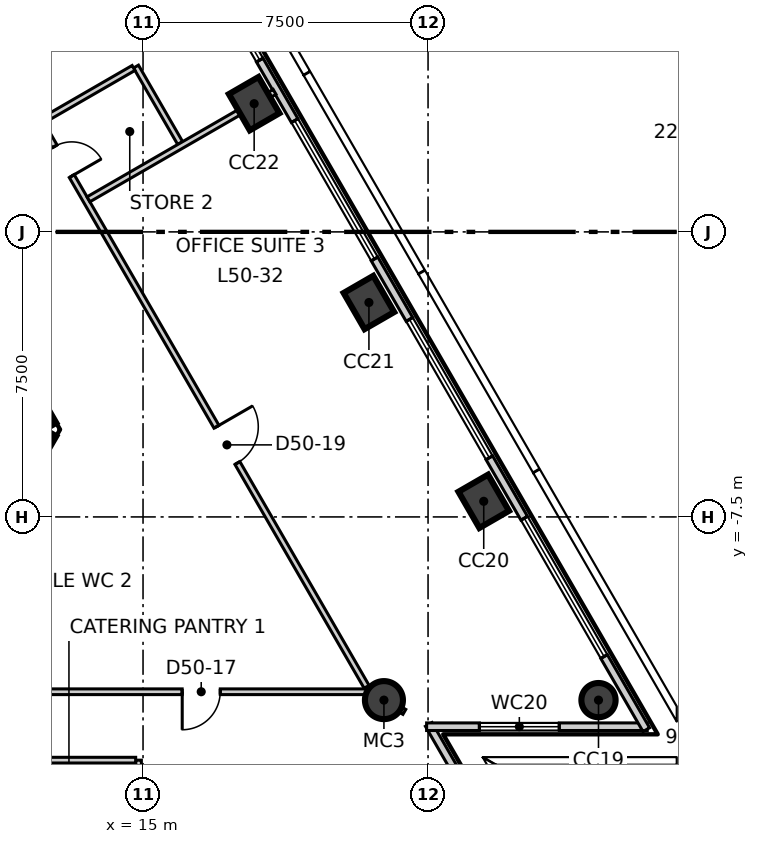
"""IFC4 building model, lengths in metres.
Left out: names, types, materials, properties, quantities, classifications, styles, units other than length and angle.
Written with IfcOpenShell. Run it as: python <this file> out.ifc"""

import sys

from ifc_helpers import new_model, si_unit, direction, frame, frame_2d, origin, origin_2d, place, context, subcontext, project, spatial, polyline, rectangle, circle, outline, extrude, element, fill, save


model = new_model("IFC4")
c1 = context("Model", 3, precision=1e-05, world=origin(), true_north=direction((0.0, 1.0)))
c2 = subcontext(c1, "Body", "Model", "MODEL_VIEW")
j1 = project(units=[si_unit("LENGTHUNIT", "METRE"), si_unit("PLANEANGLEUNIT", "RADIAN")], contexts=[c1])
p1 = place(None, origin())
s1 = spatial("IfcSite", under=j1, at=p1, CompositionType="ELEMENT")
p2 = place(p1, origin())
s2 = spatial("IfcBuilding", under=s1, at=p2, CompositionType="ELEMENT")
p3 = place(p2, frame((0.0, 0.0, 215.3)))
s3 = spatial("IfcBuildingStorey", under=s2, at=p3, CompositionType="ELEMENT", Elevation=215.3)
p4 = place(p3, frame((10.71, -8.15, -0.3), z_axis=(0.0, 0.0, 1.0), x_axis=(0.49999337185, 0.866029230515, 0.0)))
e1 = element("IfcWall", 1, at=p4, inside=s3, PredefinedType="SHEAR", context=c2, shape_type="SweptSolid", body=[
    extrude(outline(polyline([(-0.202, -0.35), (1.703, -0.35), (3.608, -0.35), (3.204, 0.35), (1.703, 0.35), (0.202, 0.35), (-0.202, -0.35)])), origin(), (0.0, 0.0, 1.0), 4.0),
])
p5 = place(p4, frame((1.003, 0.0, 0.3)))
e2 = element("IfcOpeningElement", 2, at=p5, cuts=e1, PredefinedType="OPENING", context=c2, shape_type="SweptSolid", body=[
    extrude(rectangle(XDim=1.4, YDim=2.1, at=frame_2d((0.7, 1.05))), frame((0.0, 0.36, 0.0), z_axis=(0.0, -1.0, 0.0), x_axis=(1.0, 0.0, 0.0)), (0.0, 0.0, 1.0), 0.72),
])
p6 = place(p3, frame((12.413, -5.2, -0.3), z_axis=(0.0, 0.0, 1.0), x_axis=(-0.500011533395, 0.866018744874, 0.0)))
e3 = element("IfcWall", 3, at=p6, inside=s3, PredefinedType="SHEAR", context=c2, shape_type="SweptSolid", body=[
    extrude(outline(polyline([(-0.202, -0.35), (1.782, -0.35), (3.766, -0.35), (5.75, -0.35), (7.734, -0.35), (9.718, -0.35), (11.702, -0.35), (13.686, -0.35), (15.67, -0.35), (17.654, -0.35), (19.638, -0.35), (21.622, -0.35), (21.218, 0.35), (19.307, 0.35), (17.397, 0.35), (15.486, 0.35), (13.576, 0.35), (11.665, 0.35), (9.755, 0.35), (7.844, 0.35), (5.934, 0.35), (4.023, 0.35), (2.113, 0.35), (0.202, 0.35), (-0.202, -0.35)])), origin(), (0.0, 0.0, 1.0), 4.0),
])
p7 = place(p6, frame((4.055, 0.0, 0.3)))
e4 = element("IfcOpeningElement", 4, at=p7, cuts=e3, PredefinedType="OPENING", context=c2, shape_type="SweptSolid", body=[
    extrude(rectangle(XDim=0.9, YDim=2.1, at=frame_2d((0.45, 1.05))), frame((0.0, 0.36, 0.0), z_axis=(0.0, -1.0, 0.0), x_axis=(1.0, 0.0, 0.0)), (0.0, 0.0, 1.0), 0.72),
])
p8 = place(p6, frame((16.465, 0.0, 0.3)))
e5 = element("IfcOpeningElement", 5, at=p8, cuts=e3, PredefinedType="OPENING", context=c2, shape_type="SweptSolid", body=[
    extrude(rectangle(XDim=0.9, YDim=2.1, at=frame_2d((0.45, 1.05))), frame((0.0, 0.36, 0.0), z_axis=(0.0, -1.0, 0.0), x_axis=(1.0, 0.0, 0.0)), (0.0, 0.0, 1.0), 0.72),
])
p9 = place(p3, frame((26.985, -12.32, -0.3), z_axis=(0.0, 0.0, 1.0), x_axis=(-0.5, 0.866025403784, 0.0)))
e6 = element("IfcColumn", 6, at=p9, inside=s3, PredefinedType="COLUMN", context=c2, shape_type="SweptSolid", body=[
    extrude(circle(Radius=0.45, at=origin_2d()), origin(), (0.0, 0.0, 1.0), 4.0),
])
for number, where, z_axis, x_axis in (
    (7, (23.965, -7.089, -0.3), (0.0, 0.0, 1.0), (-0.5, 0.866, 0.0)),
    (8, (20.944, -1.858, -0.3), (0.0, 0.0, 1.0), (-0.5, 0.866, 0.0)),
    (9, (17.924, 3.374, -0.3), (0.0, 0.0, 1.0), (-0.5, 0.866, 0.0)),
):
    element("IfcColumn", number, at=place(p3, frame(where, z_axis=z_axis, x_axis=x_axis)), inside=s3, PredefinedType="COLUMN", context=c2, shape_type="SweptSolid", body=[
        extrude(rectangle(XDim=1.1, YDim=0.9, at=origin_2d()), origin(), (0.0, 0.0, 1.0), 4.0),
    ])
p10 = place(p3, frame((21.339, -12.32, -0.3), z_axis=(0.0, 0.0, 1.0), x_axis=(1.0, 0.0, 0.0)))
e10 = element("IfcColumn", 10, at=p10, inside=s3, PredefinedType="COLUMN", context=c2, shape_type="SweptSolid", body=[
    extrude(circle(Radius=0.5, at=origin_2d()), origin(), (0.0, 0.0, 1.0), 4.0),
])
p11 = place(p3, frame((25.42, -17.988, 0.0), z_axis=(0.0, 0.0, 1.0), x_axis=(-0.499910499212, 0.866077070922, 0.0)))
e11 = element("IfcWall", 11, at=p11, inside=s3, PredefinedType="ELEMENTEDWALL", context=c2, shape_type="SweptSolid", body=[
    extrude(rectangle(XDim=5.807, YDim=0.2, at=frame_2d((2.903, 0.0))), origin(), (0.0, 0.0, 1.0), 3.7),
])
p12 = place(p11, frame((1.99, 0.0, 0.9)))
e12 = element("IfcOpeningElement", 12, at=p12, cuts=e11, PredefinedType="OPENING", context=c2, shape_type="SweptSolid", body=[
    extrude(rectangle(XDim=2.1, YDim=2.5, at=frame_2d((1.05, 1.25))), frame((0.0, 0.11, 0.0), z_axis=(0.0, -1.0, 0.0), x_axis=(1.0, 0.0, 0.0)), (0.0, 0.0, 1.0), 0.22),
])
p13 = place(p3, frame((22.462, -13.02, 0.0), z_axis=(0.0, 0.0, 1.0), x_axis=(1.0, 0.0, 0.0)))
e13 = element("IfcWall", 13, at=p13, inside=s3, PredefinedType="ELEMENTEDWALL", context=c2, shape_type="SweptSolid", body=[
    extrude(rectangle(XDim=5.806, YDim=0.2, at=frame_2d((2.903, 0.0))), origin(), (0.0, 0.0, 1.0), 3.7),
])
p14 = place(p13, frame((1.39, 0.0, 0.9)))
e14 = element("IfcOpeningElement", 14, at=p14, cuts=e13, PredefinedType="OPENING", context=c2, shape_type="SweptSolid", body=[
    extrude(rectangle(XDim=2.1, YDim=2.5, at=frame_2d((1.05, 1.25))), frame((0.0, 0.11, 0.0), z_axis=(0.0, -1.0, 0.0), x_axis=(1.0, 0.0, 0.0)), (0.0, 0.0, 1.0), 0.22),
])
p15 = place(p3, frame((28.243, -13.098, 0.0), z_axis=(0.0, 0.0, 1.0), x_axis=(-0.500001688958, 0.866024428662, 0.0)))
e15 = element("IfcWall", 15, at=p15, inside=s3, PredefinedType="ELEMENTEDWALL", context=c2, shape_type="SweptSolid", body=[
    extrude(rectangle(XDim=50.909, YDim=0.2, at=frame_2d((25.455, 0.0))), origin(), (0.0, 0.0, 1.0), 3.7),
])
p16 = place(p15, frame((2.223, 0.0, 0.9)))
e16 = element("IfcOpeningElement", 16, at=p16, cuts=e15, PredefinedType="OPENING", context=c2, shape_type="SweptSolid", body=[
    extrude(rectangle(XDim=4.2, YDim=2.5, at=frame_2d((2.1, 1.25))), frame((0.0, 0.11, 0.0), z_axis=(0.0, -1.0, 0.0), x_axis=(1.0, 0.0, 0.0)), (0.0, 0.0, 1.0), 0.22),
])
p17 = place(p15, frame((8.263, 0.0, 0.9)))
e17 = element("IfcOpeningElement", 17, at=p17, cuts=e15, PredefinedType="OPENING", context=c2, shape_type="SweptSolid", body=[
    extrude(rectangle(XDim=4.2, YDim=2.5, at=frame_2d((2.1, 1.25))), frame((0.0, 0.11, 0.0), z_axis=(0.0, -1.0, 0.0), x_axis=(1.0, 0.0, 0.0)), (0.0, 0.0, 1.0), 0.22),
])
p18 = place(p15, frame((14.304, 0.0, 0.9)))
e18 = element("IfcOpeningElement", 18, at=p18, cuts=e15, PredefinedType="OPENING", context=c2, shape_type="SweptSolid", body=[
    extrude(rectangle(XDim=4.2, YDim=2.5, at=frame_2d((2.1, 1.25))), frame((0.0, 0.11, 0.0), z_axis=(0.0, -1.0, 0.0), x_axis=(1.0, 0.0, 0.0)), (0.0, 0.0, 1.0), 0.22),
])
p19 = place(p15, frame((20.345, 0.0, 0.9)))
e19 = element("IfcOpeningElement", 19, at=p19, cuts=e15, PredefinedType="OPENING", context=c2, shape_type="SweptSolid", body=[
    extrude(rectangle(XDim=4.2, YDim=2.5, at=frame_2d((2.1, 1.25))), frame((0.0, 0.11, 0.0), z_axis=(0.0, -1.0, 0.0), x_axis=(1.0, 0.0, 0.0)), (0.0, 0.0, 1.0), 0.22),
])
p20 = place(p15, frame((26.385, 0.0, 0.9)))
e20 = element("IfcOpeningElement", 20, at=p20, cuts=e15, PredefinedType="OPENING", context=c2, shape_type="SweptSolid", body=[
    extrude(rectangle(XDim=4.2, YDim=2.5, at=frame_2d((2.1, 1.25))), frame((0.0, 0.11, 0.0), z_axis=(0.0, -1.0, 0.0), x_axis=(1.0, 0.0, 0.0)), (0.0, 0.0, 1.0), 0.22),
])
p21 = place(p15, frame((32.426, 0.0, 0.9)))
e21 = element("IfcOpeningElement", 21, at=p21, cuts=e15, PredefinedType="OPENING", context=c2, shape_type="SweptSolid", body=[
    extrude(rectangle(XDim=4.2, YDim=2.5, at=frame_2d((2.1, 1.25))), frame((0.0, 0.11, 0.0), z_axis=(0.0, -1.0, 0.0), x_axis=(1.0, 0.0, 0.0)), (0.0, 0.0, 1.0), 0.22),
])
p22 = place(p15, frame((38.466, 0.0, 0.9)))
e22 = element("IfcOpeningElement", 22, at=p22, cuts=e15, PredefinedType="OPENING", context=c2, shape_type="SweptSolid", body=[
    extrude(rectangle(XDim=4.2, YDim=2.5, at=frame_2d((2.1, 1.25))), frame((0.0, 0.11, 0.0), z_axis=(0.0, -1.0, 0.0), x_axis=(1.0, 0.0, 0.0)), (0.0, 0.0, 1.0), 0.22),
])
p23 = place(p15, frame((44.507, 0.0, 0.9)))
e23 = element("IfcOpeningElement", 23, at=p23, cuts=e15, PredefinedType="OPENING", context=c2, shape_type="SweptSolid", body=[
    extrude(rectangle(XDim=4.2, YDim=2.5, at=frame_2d((2.1, 1.25))), frame((0.0, 0.11, 0.0), z_axis=(0.0, -1.0, 0.0), x_axis=(1.0, 0.0, 0.0)), (0.0, 0.0, 1.0), 0.22),
])
p24 = place(p3, frame((-20.808, -12.1, 0.0), z_axis=(0.0, 0.0, 1.0), x_axis=(1.0, 0.0, 0.0)))
e24 = element("IfcWall", 24, at=p24, inside=s3, PredefinedType="PARTITIONING", context=c2, shape_type="SweptSolid", body=[
    extrude(rectangle(XDim=41.766, YDim=0.15, at=frame_2d((20.883, 0.0))), origin(), (0.0, 0.0, 1.0), 3.7),
])
p25 = place(p24, frame((6.8, 0.0, 0.0)))
e25 = element("IfcOpeningElement", 25, at=p25, cuts=e24, PredefinedType="OPENING", context=c2, shape_type="SweptSolid", body=[
    extrude(rectangle(XDim=1.1, YDim=2.1, at=frame_2d((0.55, 1.05))), frame((0.0, 0.085, 0.0), z_axis=(0.0, -1.0, 0.0), x_axis=(1.0, 0.0, 0.0)), (0.0, 0.0, 1.0), 0.17),
])
p26 = place(p24, frame((17.317, 0.0, 0.0)))
e26 = element("IfcOpeningElement", 26, at=p26, cuts=e24, PredefinedType="OPENING", context=c2, shape_type="SweptSolid", body=[
    extrude(rectangle(XDim=1.0, YDim=2.1, at=frame_2d((0.5, 1.05))), frame((0.0, 0.085, 0.0), z_axis=(0.0, -1.0, 0.0), x_axis=(1.0, 0.0, 0.0)), (0.0, 0.0, 1.0), 0.17),
])
p27 = place(p24, frame((30.658, 0.0, 0.0)))
e27 = element("IfcOpeningElement", 27, at=p27, cuts=e24, PredefinedType="OPENING", context=c2, shape_type="SweptSolid", body=[
    extrude(rectangle(XDim=1.1, YDim=2.1, at=frame_2d((0.55, 1.05))), frame((0.0, 0.085, 0.0), z_axis=(0.0, -1.0, 0.0), x_axis=(1.0, 0.0, 0.0)), (0.0, 0.0, 1.0), 0.17),
])
p28 = place(p24, frame((21.958, 0.0, 0.0)))
e28 = element("IfcOpeningElement", 28, at=p28, cuts=e24, PredefinedType="OPENING", context=c2, shape_type="SweptSolid", body=[
    extrude(rectangle(XDim=0.9, YDim=2.1, at=frame_2d((0.45, 1.05))), frame((0.0, 0.085, 0.0), z_axis=(0.0, -1.0, 0.0), x_axis=(1.0, 0.0, 0.0)), (0.0, 0.0, 1.0), 0.17),
])
p29 = place(p24, frame((25.158, 0.0, 0.0)))
e29 = element("IfcOpeningElement", 29, at=p29, cuts=e24, PredefinedType="OPENING", context=c2, shape_type="SweptSolid", body=[
    extrude(rectangle(XDim=0.9, YDim=2.1, at=frame_2d((0.45, 1.05))), frame((0.0, 0.085, 0.0), z_axis=(0.0, -1.0, 0.0), x_axis=(1.0, 0.0, 0.0)), (0.0, 0.0, 1.0), 0.17),
])
p30 = place(p24, frame((27.958, 0.0, 0.0)))
e30 = element("IfcOpeningElement", 30, at=p30, cuts=e24, PredefinedType="OPENING", context=c2, shape_type="SweptSolid", body=[
    extrude(rectangle(XDim=1.0, YDim=2.1, at=frame_2d((0.5, 1.05))), frame((0.0, 0.085, 0.0), z_axis=(0.0, -1.0, 0.0), x_axis=(1.0, 0.0, 0.0)), (0.0, 0.0, 1.0), 0.17),
])
p31 = place(p24, frame((36.839, 0.0, 0.0)))
e31 = element("IfcOpeningElement", 31, at=p31, cuts=e24, PredefinedType="OPENING", context=c2, shape_type="SweptSolid", body=[
    extrude(rectangle(XDim=1.0, YDim=2.1, at=frame_2d((0.5, 1.05))), frame((0.0, 0.085, 0.0), z_axis=(0.0, -1.0, 0.0), x_axis=(1.0, 0.0, 0.0)), (0.0, 0.0, 1.0), 0.17),
])
p32 = place(p3, frame((21.087, -12.175, 0.0), z_axis=(0.0, 0.0, 1.0), x_axis=(0.866372959518, -0.499397532049, 0.0)))
e32 = element("IfcWall", 32, at=p32, inside=s3, PredefinedType="PARTITIONING", context=c2, shape_type="SweptSolid", body=[
    extrude(rectangle(XDim=0.911, YDim=0.15, at=frame_2d((0.455, 0.0))), origin(), (0.0, 0.0, 1.0), 3.7),
])
p33 = place(p3, frame((0.075, 24.07, 0.0), z_axis=(0.0, 0.0, 1.0), x_axis=(0.500006834213, -0.866021458014, 0.0)))
e33 = element("IfcWall", 33, at=p33, inside=s3, PredefinedType="PARTITIONING", context=c2, shape_type="SweptSolid", body=[
    extrude(rectangle(XDim=41.616, YDim=0.15, at=frame_2d((20.808, 0.0))), origin(), (0.0, 0.0, 1.0), 3.7),
])
p34 = place(p33, frame((33.715, 0.0, 0.0)))
e34 = element("IfcOpeningElement", 34, at=p34, cuts=e33, PredefinedType="OPENING", context=c2, shape_type="SweptSolid", body=[
    extrude(rectangle(XDim=1.1, YDim=2.1, at=frame_2d((0.55, 1.05))), frame((0.0, 0.085, 0.0), z_axis=(0.0, -1.0, 0.0), x_axis=(1.0, 0.0, 0.0)), (0.0, 0.0, 1.0), 0.17),
])
p35 = place(p33, frame((22.098, 0.0, 0.0)))
e35 = element("IfcOpeningElement", 35, at=p35, cuts=e33, PredefinedType="OPENING", context=c2, shape_type="SweptSolid", body=[
    extrude(rectangle(XDim=1.0, YDim=2.1, at=frame_2d((0.5, 1.05))), frame((0.0, 0.085, 0.0), z_axis=(0.0, -1.0, 0.0), x_axis=(1.0, 0.0, 0.0)), (0.0, 0.0, 1.0), 0.17),
])
p36 = place(p33, frame((25.198, 0.0, 0.0)))
e36 = element("IfcOpeningElement", 36, at=p36, cuts=e33, PredefinedType="OPENING", context=c2, shape_type="SweptSolid", body=[
    extrude(rectangle(XDim=0.9, YDim=2.1, at=frame_2d((0.45, 1.05))), frame((0.0, 0.085, 0.0), z_axis=(0.0, -1.0, 0.0), x_axis=(1.0, 0.0, 0.0)), (0.0, 0.0, 1.0), 0.17),
])
p37 = place(p33, frame((9.858, 0.0, 0.0)))
e37 = element("IfcOpeningElement", 37, at=p37, cuts=e33, PredefinedType="OPENING", context=c2, shape_type="SweptSolid", body=[
    extrude(rectangle(XDim=1.1, YDim=2.1, at=frame_2d((0.55, 1.05))), frame((0.0, 0.085, 0.0), z_axis=(0.0, -1.0, 0.0), x_axis=(1.0, 0.0, 0.0)), (0.0, 0.0, 1.0), 0.17),
])
p38 = place(p33, frame((18.758, 0.0, 0.0)))
e38 = element("IfcOpeningElement", 38, at=p38, cuts=e33, PredefinedType="OPENING", context=c2, shape_type="SweptSolid", body=[
    extrude(rectangle(XDim=0.9, YDim=2.1, at=frame_2d((0.45, 1.05))), frame((0.0, 0.085, 0.0), z_axis=(0.0, -1.0, 0.0), x_axis=(1.0, 0.0, 0.0)), (0.0, 0.0, 1.0), 0.17),
])
p39 = place(p33, frame((15.558, 0.0, 0.0)))
e39 = element("IfcOpeningElement", 39, at=p39, cuts=e33, PredefinedType="OPENING", context=c2, shape_type="SweptSolid", body=[
    extrude(rectangle(XDim=0.9, YDim=2.1, at=frame_2d((0.45, 1.05))), frame((0.0, 0.085, 0.0), z_axis=(0.0, -1.0, 0.0), x_axis=(1.0, 0.0, 0.0)), (0.0, 0.0, 1.0), 0.17),
])
p40 = place(p33, frame((12.658, 0.0, 0.0)))
e40 = element("IfcOpeningElement", 40, at=p40, cuts=e33, PredefinedType="OPENING", context=c2, shape_type="SweptSolid", body=[
    extrude(rectangle(XDim=1.0, YDim=2.1, at=frame_2d((0.5, 1.05))), frame((0.0, 0.085, 0.0), z_axis=(0.0, -1.0, 0.0), x_axis=(1.0, 0.0, 0.0)), (0.0, 0.0, 1.0), 0.17),
])
p41 = place(p33, frame((3.776, 0.0, 0.0)))
e41 = element("IfcOpeningElement", 41, at=p41, cuts=e33, PredefinedType="OPENING", context=c2, shape_type="SweptSolid", body=[
    extrude(rectangle(XDim=1.1, YDim=2.1, at=frame_2d((0.55, 1.05))), frame((0.0, 0.085, 0.0), z_axis=(0.0, -1.0, 0.0), x_axis=(1.0, 0.0, 0.0)), (0.0, 0.0, 1.0), 0.17),
])
p42 = place(p3, frame((14.815, 4.35, 0.0), z_axis=(0.0, 0.0, 1.0), x_axis=(0.499934593286, -0.866063163075, 0.0)))
e42 = element("IfcWall", 42, at=p42, inside=s3, PredefinedType="PARTITIONING", context=c2, shape_type="SweptSolid", body=[
    extrude(rectangle(XDim=2.324, YDim=0.15, at=frame_2d((1.162, 0.0))), origin(), (0.0, 0.0, 1.0), 3.7),
])
p43 = place(p3, frame((12.364, 2.935, 0.0), z_axis=(0.0, 0.0, 1.0), x_axis=(0.865965703354, 0.500103389924, 0.0)))
e43 = element("IfcWall", 43, at=p43, inside=s3, PredefinedType="PARTITIONING", context=c2, shape_type="SweptSolid", body=[
    extrude(rectangle(XDim=2.755, YDim=0.15, at=frame_2d((1.378, 0.0))), origin(), (0.0, 0.0, 1.0), 3.7),
])
p44 = place(p3, frame((13.564, 0.857, 0.0), z_axis=(0.0, 0.0, 1.0), x_axis=(0.866034596441, 0.499984077514, 0.0)))
e44 = element("IfcWall", 44, at=p44, inside=s3, PredefinedType="PARTITIONING", context=c2, shape_type="SweptSolid", body=[
    extrude(rectangle(XDim=5.655, YDim=0.15, at=frame_2d((2.827, 0.0))), origin(), (0.0, 0.0, 1.0), 3.7),
])
p45 = place(p3, frame((14.881, -16.73, 0.0), z_axis=(0.0, 0.0, 1.0), x_axis=(0.0, 1.0, 0.0)))
e45 = element("IfcWall", 45, at=p45, inside=s3, PredefinedType="PARTITIONING", context=c2, shape_type="SweptSolid", body=[
    extrude(rectangle(XDim=2.83, YDim=0.15, at=frame_2d((1.415, 0.0))), origin(), (0.0, 0.0, 1.0), 3.7),
])
p46 = place(p45, frame((0.88, 0.0, 0.0)))
e46 = element("IfcOpeningElement", 46, at=p46, cuts=e45, PredefinedType="OPENING", context=c2, shape_type="SweptSolid", body=[
    extrude(rectangle(XDim=0.9, YDim=2.1, at=frame_2d((0.45, 1.05))), frame((0.0, 0.085, 0.0), z_axis=(0.0, -1.0, 0.0), x_axis=(1.0, 0.0, 0.0)), (0.0, 0.0, 1.0), 0.17),
])
p47 = place(p3, frame((12.156, -13.9, 0.0), z_axis=(0.0, 0.0, 1.0), x_axis=(1.0, 0.0, 0.0)))
e47 = element("IfcWall", 47, at=p47, inside=s3, PredefinedType="PARTITIONING", context=c2, shape_type="SweptSolid", body=[
    extrude(rectangle(XDim=2.65, YDim=0.15, at=frame_2d((1.325, 0.0))), origin(), (0.0, 0.0, 1.0), 3.7),
])
p48 = place(p14, origin())
e48 = element("IfcWindow", 48, at=p48, inside=s3, PartitioningType="SINGLE_PANEL", PredefinedType="WINDOW", context=c2, shape_type="SweptSolid", body=[
    extrude(rectangle(XDim=2.1, YDim=2.5, at=frame_2d((1.05, 1.25))), frame((0.0, 0.03, 0.0), z_axis=(0.0, -1.0, 0.0), x_axis=(1.0, 0.0, 0.0)), (0.0, 0.0, 1.0), 0.06),
])
fill(e14, e48)
p49 = place(p16, origin())
e49 = element("IfcWindow", 49, at=p49, inside=s3, PartitioningType="SINGLE_PANEL", PredefinedType="WINDOW", context=c2, shape_type="SweptSolid", body=[
    extrude(rectangle(XDim=4.2, YDim=2.5, at=frame_2d((2.1, 1.25))), frame((0.0, 0.03, 0.0), z_axis=(0.0, -1.0, 0.0), x_axis=(1.0, 0.0, 0.0)), (0.0, 0.0, 1.0), 0.06),
])
fill(e16, e49)
p50 = place(p17, origin())
e50 = element("IfcWindow", 50, at=p50, inside=s3, PartitioningType="SINGLE_PANEL", PredefinedType="WINDOW", context=c2, shape_type="SweptSolid", body=[
    extrude(rectangle(XDim=4.2, YDim=2.5, at=frame_2d((2.1, 1.25))), frame((0.0, 0.03, 0.0), z_axis=(0.0, -1.0, 0.0), x_axis=(1.0, 0.0, 0.0)), (0.0, 0.0, 1.0), 0.06),
])
fill(e17, e50)
p51 = place(p18, origin())
e51 = element("IfcWindow", 51, at=p51, inside=s3, PartitioningType="SINGLE_PANEL", PredefinedType="WINDOW", context=c2, shape_type="SweptSolid", body=[
    extrude(rectangle(XDim=4.2, YDim=2.5, at=frame_2d((2.1, 1.25))), frame((0.0, 0.03, 0.0), z_axis=(0.0, -1.0, 0.0), x_axis=(1.0, 0.0, 0.0)), (0.0, 0.0, 1.0), 0.06),
])
fill(e18, e51)
p52 = place(p19, origin())
e52 = element("IfcWindow", 52, at=p52, inside=s3, PartitioningType="SINGLE_PANEL", PredefinedType="WINDOW", context=c2, shape_type="SweptSolid", body=[
    extrude(rectangle(XDim=4.2, YDim=2.5, at=frame_2d((2.1, 1.25))), frame((0.0, 0.03, 0.0), z_axis=(0.0, -1.0, 0.0), x_axis=(1.0, 0.0, 0.0)), (0.0, 0.0, 1.0), 0.06),
])
fill(e19, e52)
p53 = place(p31, origin())
e53 = element("IfcDoor", 53, at=p53, inside=s3, OperationType="SINGLE_SWING_LEFT", PredefinedType="DOOR", context=c2, shape_type="SweptSolid", body=[
    extrude(rectangle(XDim=1.0, YDim=2.1, at=frame_2d((0.5, 1.05))), frame((0.0, 0.025, 0.0), z_axis=(0.0, -1.0, 0.0), x_axis=(1.0, 0.0, 0.0)), (0.0, 0.0, 1.0), 0.05),
])
fill(e31, e53)
p54 = place(p34, origin())
e54 = element("IfcDoor", 54, at=p54, inside=s3, OperationType="SINGLE_SWING_RIGHT", PredefinedType="DOOR", context=c2, shape_type="SweptSolid", body=[
    extrude(rectangle(XDim=1.1, YDim=2.1, at=frame_2d((0.55, 1.05))), frame((0.0, 0.025, 0.0), z_axis=(0.0, -1.0, 0.0), x_axis=(1.0, 0.0, 0.0)), (0.0, 0.0, 1.0), 0.05),
])
fill(e34, e54)
p55 = place(p36, origin())
e55 = element("IfcDoor", 55, at=p55, inside=s3, OperationType="SINGLE_SWING_LEFT", PredefinedType="DOOR", context=c2, shape_type="SweptSolid", body=[
    extrude(rectangle(XDim=0.9, YDim=2.1, at=frame_2d((0.45, 1.05))), frame((0.0, 0.025, 0.0), z_axis=(0.0, -1.0, 0.0), x_axis=(1.0, 0.0, 0.0)), (0.0, 0.0, 1.0), 0.05),
])
fill(e36, e55)
save(model, sys.argv[1])
